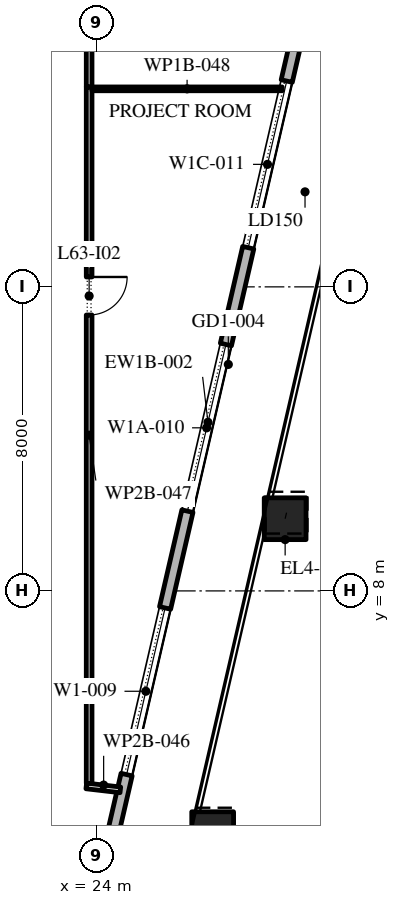
"""IFC4 building model, lengths in metres.
Left out: names, types, materials, properties, quantities, classifications, styles, units other than length and angle.
Written with IfcOpenShell. Run it as: python <this file> out.ifc"""

import sys

from ifc_helpers import new_model, si_unit, direction, frame, frame_2d, origin, origin_2d, place, context, subcontext, project, spatial, rectangle, extrude, element, fill, save


model = new_model("IFC4")
c1 = context("Model", 3, precision=1e-05, world=origin(), true_north=direction((0.0, 1.0)))
c2 = subcontext(c1, "Body", "Model", "MODEL_VIEW")
j1 = project(units=[si_unit("LENGTHUNIT", "METRE"), si_unit("PLANEANGLEUNIT", "RADIAN")], contexts=[c1])
p1 = place(None, origin())
s1 = spatial("IfcSite", under=j1, at=p1, CompositionType="ELEMENT")
p2 = place(p1, origin())
s2 = spatial("IfcBuilding", under=s1, at=p2, CompositionType="ELEMENT")
p3 = place(p2, frame((0.0, 0.0, 289.2)))
s3 = spatial("IfcBuildingStorey", under=s2, at=p3, CompositionType="ELEMENT", Elevation=289.2)
p4 = place(p3, frame((27.05, 1.639, 0.0), z_axis=(0.005869083212, 0.025335844359, 0.999661767226), x_axis=(-0.974202561131, 0.225675363932, 0.0)))
e1 = element("IfcColumn", 1, at=p4, inside=s3, PredefinedType="COLUMN", context=c2, shape_type="SweptSolid", body=[
    extrude(rectangle(XDim=1.1, YDim=1.1, at=origin_2d()), origin(), (0.0, 0.0, 1.0), 4.201),
])
p5 = place(p3, frame((28.958, 9.899, 0.0), z_axis=(0.008770884695, 0.037929719907, 0.99924191662), x_axis=(-0.974290512438, 0.225295355862, 0.0)))
e2 = element("IfcColumn", 2, at=p5, inside=s3, PredefinedType="COLUMN", context=c2, shape_type="SweptSolid", body=[
    extrude(rectangle(XDim=1.1, YDim=1.1, at=origin_2d()), origin(), (0.0, 0.0, 1.0), 4.203),
])
p6 = place(p3, frame((21.359, -11.678, 0.0), z_axis=(0.0, 0.0, 1.0), x_axis=(0.224949198343, 0.974370493275, 0.0)))
e3 = element("IfcWall", 3, at=p6, inside=s3, PredefinedType="STANDARD", context=c2, shape_type="SweptSolid", body=[
    extrude(rectangle(XDim=49.5, YDim=0.3, at=frame_2d((24.75, 0.0))), origin(), (0.0, 0.0, 1.0), 3.95),
])
p7 = place(p6, frame((1.157, 0.0, 0.45)))
e4 = element("IfcOpeningElement", 4, at=p7, cuts=e3, PredefinedType="OPENING", context=c2, shape_type="SweptSolid", body=[
    extrude(rectangle(XDim=4.5, YDim=3.05, at=frame_2d((2.25, 1.525))), frame((0.0, 0.16, 0.0), z_axis=(0.0, -1.0, 0.0), x_axis=(1.0, 0.0, 0.0)), (0.0, 0.0, 1.0), 0.32),
])
p8 = place(p6, frame((8.121, 0.0, 0.45)))
e5 = element("IfcOpeningElement", 5, at=p8, cuts=e3, PredefinedType="OPENING", context=c2, shape_type="SweptSolid", body=[
    extrude(rectangle(XDim=4.5, YDim=3.05, at=frame_2d((2.25, 1.525))), frame((0.0, 0.16, 0.0), z_axis=(0.0, -1.0, 0.0), x_axis=(1.0, 0.0, 0.0)), (0.0, 0.0, 1.0), 0.32),
])
p9 = place(p6, frame((15.236, 0.0, 0.45)))
e6 = element("IfcOpeningElement", 6, at=p9, cuts=e3, PredefinedType="OPENING", context=c2, shape_type="SweptSolid", body=[
    extrude(rectangle(XDim=4.5, YDim=3.05, at=frame_2d((2.25, 1.525))), frame((0.0, 0.16, 0.0), z_axis=(0.0, -1.0, 0.0), x_axis=(1.0, 0.0, 0.0)), (0.0, 0.0, 1.0), 0.32),
])
p10 = place(p6, frame((22.35, 0.0, 0.45)))
e7 = element("IfcOpeningElement", 7, at=p10, cuts=e3, PredefinedType="OPENING", context=c2, shape_type="SweptSolid", body=[
    extrude(rectangle(XDim=4.5, YDim=3.0, at=frame_2d((2.25, 1.5))), frame((0.0, 0.16, 0.0), z_axis=(0.0, -1.0, 0.0), x_axis=(1.0, 0.0, 0.0)), (0.0, 0.0, 1.0), 0.32),
])
p11 = place(p6, frame((29.464, 0.0, 0.45)))
e8 = element("IfcOpeningElement", 8, at=p11, cuts=e3, PredefinedType="OPENING", context=c2, shape_type="SweptSolid", body=[
    extrude(rectangle(XDim=4.5, YDim=2.9, at=frame_2d((2.25, 1.45))), frame((0.0, 0.16, 0.0), z_axis=(0.0, -1.0, 0.0), x_axis=(1.0, 0.0, 0.0)), (0.0, 0.0, 1.0), 0.32),
])
p12 = place(p6, frame((37.628, 0.0, 0.0)))
e9 = element("IfcOpeningElement", 9, at=p12, cuts=e3, PredefinedType="OPENING", context=c2, shape_type="SweptSolid", body=[
    extrude(rectangle(XDim=2.4, YDim=3.275, at=frame_2d((1.2, 1.637))), frame((0.0, 0.16, 0.0), z_axis=(0.0, -1.0, 0.0), x_axis=(1.0, 0.0, 0.0)), (0.0, 0.0, 1.0), 0.32),
])
p13 = place(p6, frame((43.693, 0.0, 0.45)))
e10 = element("IfcOpeningElement", 10, at=p13, cuts=e3, PredefinedType="OPENING", context=c2, shape_type="SweptSolid", body=[
    extrude(rectangle(XDim=4.5, YDim=3.05, at=frame_2d((2.25, 1.525))), frame((0.0, 0.16, 0.0), z_axis=(0.0, -1.0, 0.0), x_axis=(1.0, 0.0, 0.0)), (0.0, 0.0, 1.0), 0.32),
])
p14 = place(p3, frame((23.725, 2.869, 0.0), z_axis=(0.0, 0.0, 1.0), x_axis=(0.993330469257, -0.115302119865, 0.0)))
e11 = element("IfcWall", 11, at=p14, inside=s3, PredefinedType="PARTITIONING", context=c2, shape_type="SweptSolid", body=[
    extrude(rectangle(XDim=0.902, YDim=0.15, at=frame_2d((0.451, 0.0))), origin(), (0.0, 0.0, 1.0), 3.95),
])
p15 = place(p3, frame((23.8, 21.26, 0.0), z_axis=(0.0, 0.0, 1.0), x_axis=(0.0, -1.0, 0.0)))
e12 = element("IfcWall", 12, at=p15, inside=s3, PredefinedType="PARTITIONING", context=c2, shape_type="SweptSolid", body=[
    extrude(rectangle(XDim=18.325, YDim=0.15, at=frame_2d((9.163, 0.0))), origin(), (0.0, 0.0, 1.0), 3.95),
])
p16 = place(p15, frame((5.0, 0.0, 0.0)))
e13 = element("IfcOpeningElement", 13, at=p16, cuts=e12, PredefinedType="OPENING", context=c2, shape_type="SweptSolid", body=[
    extrude(rectangle(XDim=1.0, YDim=2.1, at=frame_2d((0.5, 1.05))), frame((0.0, 0.085, 0.0), z_axis=(0.0, -1.0, 0.0), x_axis=(1.0, 0.0, 0.0)), (0.0, 0.0, 1.0), 0.17),
])
p17 = place(p3, frame((23.875, 21.21, 0.0), z_axis=(0.0, 0.0, 1.0), x_axis=(1.0, 0.0, 0.0)))
e14 = element("IfcWall", 14, at=p17, inside=s3, PredefinedType="PARTITIONING", context=c2, shape_type="SweptSolid", body=[
    extrude(rectangle(XDim=5.005, YDim=0.1, at=frame_2d((2.502, 0.0))), origin(), (0.0, 0.0, 1.0), 3.95),
])
p18 = place(p3, frame((23.8, 29.71, 0.0), z_axis=(0.0, 0.0, 1.0), x_axis=(0.0, -1.0, 0.0)))
e15 = element("IfcWall", 15, at=p18, inside=s3, PredefinedType="PARTITIONING", context=c2, shape_type="SweptSolid", body=[
    extrude(rectangle(XDim=8.45, YDim=0.15, at=frame_2d((4.225, 0.0))), origin(), (0.0, 0.0, 1.0), 3.95),
])
p19 = place(p18, frame((4.6, 0.0, 0.0)))
e16 = element("IfcOpeningElement", 16, at=p19, cuts=e15, PredefinedType="OPENING", context=c2, shape_type="SweptSolid", body=[
    extrude(rectangle(XDim=1.0, YDim=2.1, at=frame_2d((0.5, 1.05))), frame((0.0, 0.085, 0.0), z_axis=(0.0, -1.0, 0.0), x_axis=(1.0, 0.0, 0.0)), (0.0, 0.0, 1.0), 0.17),
])
p20 = place(p9, origin())
e17 = element("IfcWindow", 17, at=p20, inside=s3, PartitioningType="DOUBLE_PANEL_VERTICAL", PredefinedType="WINDOW", context=c2, shape_type="SweptSolid", body=[
    extrude(rectangle(XDim=4.5, YDim=3.05, at=frame_2d((2.25, 1.525))), frame((0.0, 0.03, 0.0), z_axis=(0.0, -1.0, 0.0), x_axis=(1.0, 0.0, 0.0)), (0.0, 0.0, 1.0), 0.06),
])
fill(e6, e17)
p21 = place(p10, origin())
e18 = element("IfcWindow", 18, at=p21, inside=s3, PartitioningType="DOUBLE_PANEL_VERTICAL", PredefinedType="WINDOW", context=c2, shape_type="SweptSolid", body=[
    extrude(rectangle(XDim=4.5, YDim=3.0, at=frame_2d((2.25, 1.5))), frame((0.0, 0.03, 0.0), z_axis=(0.0, -1.0, 0.0), x_axis=(1.0, 0.0, 0.0)), (0.0, 0.0, 1.0), 0.06),
])
fill(e7, e18)
p22 = place(p11, origin())
e19 = element("IfcWindow", 19, at=p22, inside=s3, PartitioningType="DOUBLE_PANEL_VERTICAL", PredefinedType="WINDOW", context=c2, shape_type="SweptSolid", body=[
    extrude(rectangle(XDim=4.5, YDim=2.9, at=frame_2d((2.25, 1.45))), frame((0.0, 0.03, 0.0), z_axis=(0.0, -1.0, 0.0), x_axis=(1.0, 0.0, 0.0)), (0.0, 0.0, 1.0), 0.06),
])
fill(e8, e19)
p23 = place(p16, origin())
e20 = element("IfcDoor", 20, at=p23, inside=s3, OperationType="SINGLE_SWING_RIGHT", PredefinedType="DOOR", context=c2, shape_type="SweptSolid", body=[
    extrude(rectangle(XDim=1.0, YDim=2.1, at=frame_2d((0.5, 1.05))), frame((0.0, 0.025, 0.0), z_axis=(0.0, -1.0, 0.0), x_axis=(1.0, 0.0, 0.0)), (0.0, 0.0, 1.0), 0.05),
])
fill(e13, e20)
save(model, sys.argv[1])
